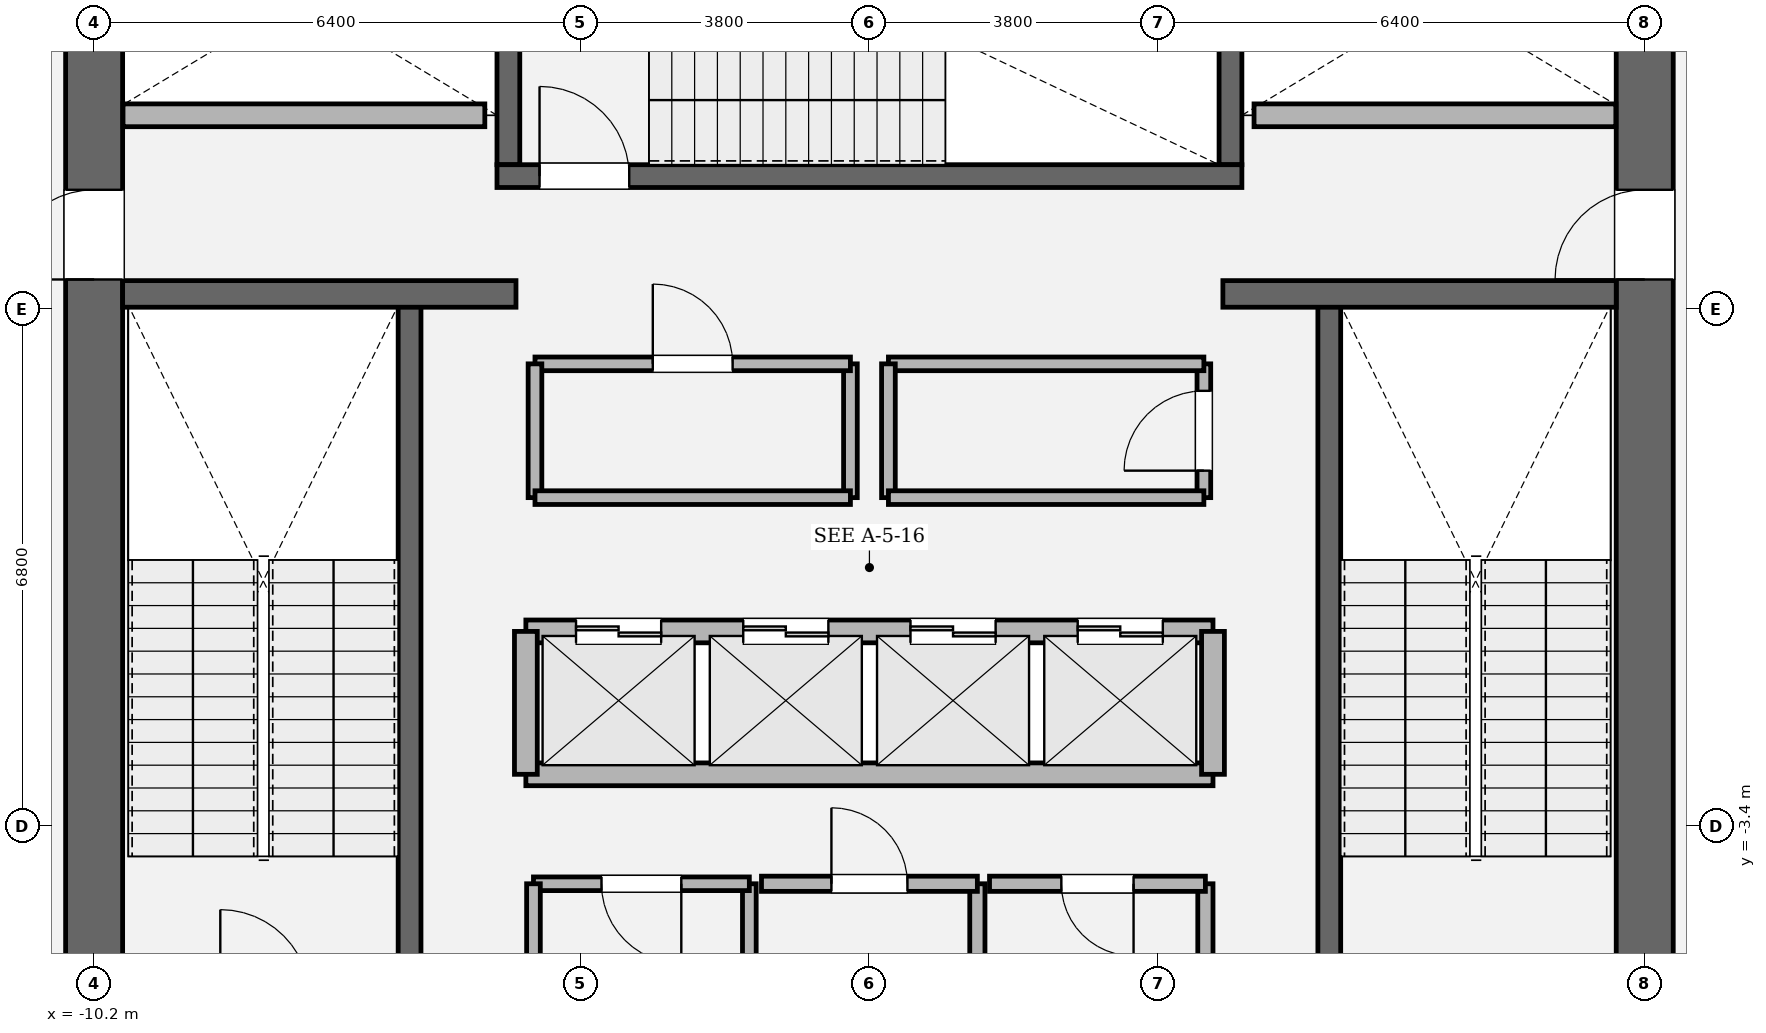
"""IFC4 building model, lengths in metres.
Left out: names, types, materials, properties, quantities, classifications, styles, units other than length and angle.
Written with IfcOpenShell. Run it as: python <this file> out.ifc"""

import sys

from ifc_helpers import new_model, si_unit, direction, frame, frame_2d, origin, place, context, subcontext, project, spatial, rectangle, extrude, element, fill, save


model = new_model("IFC4")
c1 = context("Model", 3, precision=1e-05, world=origin(), true_north=direction((0.0, 1.0)))
c2 = subcontext(c1, "Body", "Model", "MODEL_VIEW")
j1 = project(units=[si_unit("LENGTHUNIT", "METRE"), si_unit("PLANEANGLEUNIT", "RADIAN")], contexts=[c1])
p1 = place(None, origin())
s1 = spatial("IfcSite", under=j1, at=p1, CompositionType="ELEMENT")
p2 = place(p1, origin())
s2 = spatial("IfcBuilding", under=s1, at=p2, CompositionType="ELEMENT")
p3 = place(p2, frame((0.0, 0.0, 76.8)))
s3 = spatial("IfcBuildingStorey", under=s2, at=p3, CompositionType="ELEMENT", Elevation=76.8)
p4 = place(p3, frame((-10.2, -8.825, 0.0), z_axis=(0.0, 0.0, 1.0), x_axis=(0.0, 1.0, 0.0)))
e1 = element("IfcWall", 1, at=p4, inside=s3, PredefinedType="SHEAR", context=c2, shape_type="SweptSolid", body=[
    extrude(rectangle(XDim=17.65, YDim=0.75, at=frame_2d((8.825, 0.0))), origin(), (0.0, 0.0, 1.0), 4.05),
])
p5 = place(p4, frame((12.615, 0.0, 0.0)))
e2 = element("IfcOpeningElement", 2, at=p5, cuts=e1, PredefinedType="OPENING", context=c2, shape_type="SweptSolid", body=[
    extrude(rectangle(XDim=1.18, YDim=2.2, at=frame_2d((0.59, 1.1))), frame((0.0, 0.385, 0.0), z_axis=(0.0, -1.0, 0.0), x_axis=(1.0, 0.0, 0.0)), (0.0, 0.0, 1.0), 0.77),
])
p6 = place(p3, frame((10.2, 8.825, 0.0), z_axis=(0.0, 0.0, 1.0), x_axis=(0.0, -1.0, 0.0)))
e3 = element("IfcWall", 3, at=p6, inside=s3, PredefinedType="SHEAR", context=c2, shape_type="SweptSolid", body=[
    extrude(rectangle(XDim=17.65, YDim=0.75, at=frame_2d((8.825, 0.0))), origin(), (0.0, 0.0, 1.0), 4.05),
])
p7 = place(p6, frame((3.855, 0.0, 0.0)))
e4 = element("IfcOpeningElement", 4, at=p7, cuts=e3, PredefinedType="OPENING", context=c2, shape_type="SweptSolid", body=[
    extrude(rectangle(XDim=1.18, YDim=2.2, at=frame_2d((0.59, 1.1))), frame((0.0, 0.385, 0.0), z_axis=(0.0, -1.0, 0.0), x_axis=(1.0, 0.0, 0.0)), (0.0, 0.0, 1.0), 0.77),
])
for number, where, z_axis, x_axis in (
    (5, (-6.05, -5.5, 0.0), (0.0, 0.0, 1.0), (0.0, 1.0, 0.0)),
    (6, (6.05, 3.45, 0.0), (0.0, 0.0, 1.0), (0.0, -1.0, 0.0)),
):
    element("IfcWall", number, at=place(p3, frame(where, z_axis=z_axis, x_axis=x_axis)), inside=s3, PredefinedType="SOLIDWALL", context=c2, shape_type="SweptSolid", body=[
        extrude(rectangle(XDim=8.95, YDim=0.3, at=frame_2d((4.475, 0.0))), origin(), (0.0, 0.0, 1.0), 4.05),
    ])
for number, where, z_axis, x_axis in (
    (7, (-4.75, 5.3, 0.0), (0.0, 0.0, 1.0), (0.0, 1.0, 0.0)),
    (8, (4.75, 8.825, 0.0), (0.0, 0.0, 1.0), (0.0, -1.0, 0.0)),
):
    element("IfcWall", number, at=place(p3, frame(where, z_axis=z_axis, x_axis=x_axis)), inside=s3, PredefinedType="SOLIDWALL", context=c2, shape_type="SweptSolid", body=[
        extrude(rectangle(XDim=3.525, YDim=0.3, at=frame_2d((1.762, 0.0))), origin(), (0.0, 0.0, 1.0), 4.05),
    ])
p8 = place(p3, frame((-4.9, 5.15, 0.0), z_axis=(0.0, 0.0, 1.0), x_axis=(1.0, 0.0, 0.0)))
e9 = element("IfcWall", 9, at=p8, inside=s3, PredefinedType="SOLIDWALL", context=c2, shape_type="SweptSolid", body=[
    extrude(rectangle(XDim=9.8, YDim=0.3, at=frame_2d((4.9, 0.0))), origin(), (0.0, 0.0, 1.0), 4.05),
])
p9 = place(p8, frame((0.56, 0.0, 0.0)))
e10 = element("IfcOpeningElement", 10, at=p9, cuts=e9, PredefinedType="OPENING", context=c2, shape_type="SweptSolid", body=[
    extrude(rectangle(XDim=1.18, YDim=2.2, at=frame_2d((0.59, 1.1))), frame((0.0, 0.16, 0.0), z_axis=(0.0, -1.0, 0.0), x_axis=(1.0, 0.0, 0.0)), (0.0, 0.0, 1.0), 0.32),
])
for number, where, z_axis, x_axis in (
    (11, (-9.825, 3.6, 0.0), (0.0, 0.0, 1.0), (1.0, 0.0, 0.0)),
    (12, (4.65, 3.6, 0.0), (0.0, 0.0, 1.0), (1.0, 0.0, 0.0)),
):
    element("IfcWall", number, at=place(p3, frame(where, z_axis=z_axis, x_axis=x_axis)), inside=s3, PredefinedType="SOLIDWALL", context=c2, shape_type="SweptSolid", body=[
        extrude(rectangle(XDim=5.175, YDim=0.35, at=frame_2d((2.587, 0.0))), origin(), (0.0, 0.0, 1.0), 4.05),
    ])
p10 = place(p3, frame((-4.52, -0.84, 0.0), z_axis=(0.0, 0.0, 1.0), x_axis=(1.0, 0.0, 0.0)))
e13 = element("IfcWall", 13, at=p10, inside=s3, PredefinedType="SOLIDWALL", context=c2, shape_type="SweptSolid", body=[
    extrude(rectangle(XDim=9.04, YDim=0.3, at=frame_2d((4.52, 0.0))), origin(), (0.0, 0.0, 1.0), 3.81),
])
p11 = place(p10, frame((0.66, 0.0, 0.0)))
e14 = element("IfcOpeningElement", 14, at=p11, cuts=e13, PredefinedType="OPENING", context=c2, shape_type="SweptSolid", body=[
    extrude(rectangle(XDim=1.12, YDim=2.25, at=frame_2d((0.56, 1.125))), frame((0.0, 0.16, 0.0), z_axis=(0.0, -1.0, 0.0), x_axis=(1.0, 0.0, 0.0)), (0.0, 0.0, 1.0), 0.32),
])
p12 = place(p10, frame((2.86, 0.0, 0.0)))
e15 = element("IfcOpeningElement", 15, at=p12, cuts=e13, PredefinedType="OPENING", context=c2, shape_type="SweptSolid", body=[
    extrude(rectangle(XDim=1.12, YDim=2.25, at=frame_2d((0.56, 1.125))), frame((0.0, 0.16, 0.0), z_axis=(0.0, -1.0, 0.0), x_axis=(1.0, 0.0, 0.0)), (0.0, 0.0, 1.0), 0.32),
])
p13 = place(p10, frame((5.06, 0.0, 0.0)))
e16 = element("IfcOpeningElement", 16, at=p13, cuts=e13, PredefinedType="OPENING", context=c2, shape_type="SweptSolid", body=[
    extrude(rectangle(XDim=1.12, YDim=2.25, at=frame_2d((0.56, 1.125))), frame((0.0, 0.16, 0.0), z_axis=(0.0, -1.0, 0.0), x_axis=(1.0, 0.0, 0.0)), (0.0, 0.0, 1.0), 0.32),
])
p14 = place(p10, frame((7.26, 0.0, 0.0)))
e17 = element("IfcOpeningElement", 17, at=p14, cuts=e13, PredefinedType="OPENING", context=c2, shape_type="SweptSolid", body=[
    extrude(rectangle(XDim=1.12, YDim=2.25, at=frame_2d((0.56, 1.125))), frame((0.0, 0.16, 0.0), z_axis=(0.0, -1.0, 0.0), x_axis=(1.0, 0.0, 0.0)), (0.0, 0.0, 1.0), 0.32),
])
p15 = place(p3, frame((-4.52, -2.72, 0.0), z_axis=(0.0, 0.0, 1.0), x_axis=(1.0, 0.0, 0.0)))
e18 = element("IfcWall", 18, at=p15, inside=s3, PredefinedType="SOLIDWALL", context=c2, shape_type="SweptSolid", body=[
    extrude(rectangle(XDim=9.04, YDim=0.3, at=frame_2d((4.52, 0.0))), origin(), (0.0, 0.0, 1.0), 3.81),
])
for number, where, z_axis, x_axis in (
    (19, (-4.52, -2.72, 0.0), (0.0, 0.0, 1.0), (0.0, 1.0, 0.0)),
    (20, (4.52, -2.72, 0.0), (0.0, 0.0, 1.0), (0.0, 1.0, 0.0)),
):
    element("IfcWall", number, at=place(p3, frame(where, z_axis=z_axis, x_axis=x_axis)), inside=s3, PredefinedType="SOLIDWALL", context=c2, shape_type="SweptSolid", body=[
        extrude(rectangle(XDim=1.88, YDim=0.3, at=frame_2d((0.94, 0.0))), origin(), (0.0, 0.0, 1.0), 3.81),
    ])
for number, where, z_axis, x_axis in (
    (21, (-9.82, 5.95, 0.0), (0.0, 0.0, 1.0), (1.0, 0.0, 0.0)),
    (22, (5.06, 5.95, 0.0), (0.0, 0.0, 1.0), (1.0, 0.0, 0.0)),
):
    element("IfcWall", number, at=place(p3, frame(where, z_axis=z_axis, x_axis=x_axis)), inside=s3, PredefinedType="SOLIDWALL", context=c2, shape_type="SweptSolid", body=[
        extrude(rectangle(XDim=4.76, YDim=0.3, at=frame_2d((2.38, 0.0))), origin(), (0.0, 0.0, 1.0), 3.81),
    ])
p16 = place(p3, frame((-1.58, -5.9, 0.0), z_axis=(0.0, 0.0, 1.0), x_axis=(0.0, 1.0, 0.0)))
e23 = element("IfcWall", 23, at=p16, inside=s3, PredefinedType="PARTITIONING", context=c2, shape_type="SweptSolid", body=[
    extrude(rectangle(XDim=1.74, YDim=0.18, at=frame_2d((0.87, 0.0))), origin(), (0.0, 0.0, 1.0), 3.81),
])
p17 = place(p3, frame((-1.58, -4.16, 0.0), z_axis=(0.0, 0.0, 1.0), x_axis=(-1.0, 0.0, 0.0)))
e24 = element("IfcWall", 24, at=p17, inside=s3, PredefinedType="PARTITIONING", context=c2, shape_type="SweptSolid", body=[
    extrude(rectangle(XDim=2.84, YDim=0.18, at=frame_2d((1.42, 0.0))), origin(), (0.0, 0.0, 1.0), 3.81),
])
p18 = place(p17, frame((0.895, 0.0, 0.0)))
e25 = element("IfcOpeningElement", 25, at=p18, cuts=e24, PredefinedType="OPENING", context=c2, shape_type="SweptSolid", body=[
    extrude(rectangle(XDim=1.05, YDim=2.2, at=frame_2d((0.525, 1.1))), frame((0.0, 0.1, 0.0), z_axis=(0.0, -1.0, 0.0), x_axis=(1.0, 0.0, 0.0)), (0.0, 0.0, 1.0), 0.2),
])
p19 = place(p3, frame((-4.42, -4.16, 0.0), z_axis=(0.0, 0.0, 1.0), x_axis=(0.0, -1.0, 0.0)))
e26 = element("IfcWall", 26, at=p19, inside=s3, PredefinedType="PARTITIONING", context=c2, shape_type="SweptSolid", body=[
    extrude(rectangle(XDim=1.74, YDim=0.18, at=frame_2d((0.87, 0.0))), origin(), (0.0, 0.0, 1.0), 3.81),
])
p20 = place(p3, frame((1.42, -5.9, 0.0), z_axis=(0.0, 0.0, 1.0), x_axis=(0.0, 1.0, 0.0)))
e27 = element("IfcWall", 27, at=p20, inside=s3, PredefinedType="SOLIDWALL", context=c2, shape_type="SweptSolid", body=[
    extrude(rectangle(XDim=1.74, YDim=0.2, at=frame_2d((0.87, 0.0))), origin(), (0.0, 0.0, 1.0), 3.81),
])
p21 = place(p3, frame((1.42, -4.16, 0.0), z_axis=(0.0, 0.0, 1.0), x_axis=(-1.0, 0.0, 0.0)))
e28 = element("IfcWall", 28, at=p21, inside=s3, PredefinedType="SOLIDWALL", context=c2, shape_type="SweptSolid", body=[
    extrude(rectangle(XDim=2.84, YDim=0.2, at=frame_2d((1.42, 0.0))), origin(), (0.0, 0.0, 1.0), 3.81),
])
p22 = place(p21, frame((0.92, 0.0, 0.0)))
e29 = element("IfcOpeningElement", 29, at=p22, cuts=e28, PredefinedType="OPENING", context=c2, shape_type="SweptSolid", body=[
    extrude(rectangle(XDim=1.0, YDim=2.15, at=frame_2d((0.5, 1.075))), frame((0.0, 0.11, 0.0), z_axis=(0.0, -1.0, 0.0), x_axis=(1.0, 0.0, 0.0)), (0.0, 0.0, 1.0), 0.22),
])
p23 = place(p3, frame((4.42, -5.9, 0.0), z_axis=(0.0, 0.0, 1.0), x_axis=(0.0, 1.0, 0.0)))
e30 = element("IfcWall", 30, at=p23, inside=s3, PredefinedType="SOLIDWALL", context=c2, shape_type="SweptSolid", body=[
    extrude(rectangle(XDim=1.74, YDim=0.2, at=frame_2d((0.87, 0.0))), origin(), (0.0, 0.0, 1.0), 3.81),
])
p24 = place(p3, frame((4.42, -4.16, 0.0), z_axis=(0.0, 0.0, 1.0), x_axis=(-1.0, 0.0, 0.0)))
e31 = element("IfcWall", 31, at=p24, inside=s3, PredefinedType="SOLIDWALL", context=c2, shape_type="SweptSolid", body=[
    extrude(rectangle(XDim=2.84, YDim=0.2, at=frame_2d((1.42, 0.0))), origin(), (0.0, 0.0, 1.0), 3.81),
])
p25 = place(p24, frame((0.945, 0.0, 0.0)))
e32 = element("IfcOpeningElement", 32, at=p25, cuts=e31, PredefinedType="OPENING", context=c2, shape_type="SweptSolid", body=[
    extrude(rectangle(XDim=0.95, YDim=2.15, at=frame_2d((0.475, 1.075))), frame((0.0, 0.11, 0.0), z_axis=(0.0, -1.0, 0.0), x_axis=(1.0, 0.0, 0.0)), (0.0, 0.0, 1.0), 0.22),
])
p26 = place(p3, frame((-0.25, 0.92, 0.0), z_axis=(0.0, 0.0, 1.0), x_axis=(0.0, 1.0, 0.0)))
e33 = element("IfcWall", 33, at=p26, inside=s3, PredefinedType="PARTITIONING", context=c2, shape_type="SweptSolid", body=[
    extrude(rectangle(XDim=1.76, YDim=0.18, at=frame_2d((0.88, 0.0))), origin(), (0.0, 0.0, 1.0), 3.81),
])
p27 = place(p3, frame((-0.25, 2.68, 0.0), z_axis=(0.0, 0.0, 1.0), x_axis=(-1.0, 0.0, 0.0)))
e34 = element("IfcWall", 34, at=p27, inside=s3, PredefinedType="PARTITIONING", context=c2, shape_type="SweptSolid", body=[
    extrude(rectangle(XDim=4.15, YDim=0.18, at=frame_2d((2.075, 0.0))), origin(), (0.0, 0.0, 1.0), 3.81),
])
p28 = place(p27, frame((1.55, 0.0, 0.0)))
e35 = element("IfcOpeningElement", 35, at=p28, cuts=e34, PredefinedType="OPENING", context=c2, shape_type="SweptSolid", body=[
    extrude(rectangle(XDim=1.05, YDim=2.2, at=frame_2d((0.525, 1.1))), frame((0.0, 0.1, 0.0), z_axis=(0.0, -1.0, 0.0), x_axis=(1.0, 0.0, 0.0)), (0.0, 0.0, 1.0), 0.2),
])
p29 = place(p3, frame((-4.4, 2.68, 0.0), z_axis=(0.0, 0.0, 1.0), x_axis=(0.0, -1.0, 0.0)))
e36 = element("IfcWall", 36, at=p29, inside=s3, PredefinedType="PARTITIONING", context=c2, shape_type="SweptSolid", body=[
    extrude(rectangle(XDim=1.76, YDim=0.18, at=frame_2d((0.88, 0.0))), origin(), (0.0, 0.0, 1.0), 3.81),
])
p30 = place(p3, frame((-4.4, 0.92, 0.0), z_axis=(0.0, 0.0, 1.0), x_axis=(1.0, 0.0, 0.0)))
e37 = element("IfcWall", 37, at=p30, inside=s3, PredefinedType="PARTITIONING", context=c2, shape_type="SweptSolid", body=[
    extrude(rectangle(XDim=4.15, YDim=0.18, at=frame_2d((2.075, 0.0))), origin(), (0.0, 0.0, 1.0), 3.81),
])
p31 = place(p3, frame((4.4, 0.92, 0.0), z_axis=(0.0, 0.0, 1.0), x_axis=(0.0, 1.0, 0.0)))
e38 = element("IfcWall", 38, at=p31, inside=s3, PredefinedType="PARTITIONING", context=c2, shape_type="SweptSolid", body=[
    extrude(rectangle(XDim=1.76, YDim=0.18, at=frame_2d((0.88, 0.0))), origin(), (0.0, 0.0, 1.0), 3.81),
])
p32 = place(p31, frame((0.355, 0.0, 0.0)))
e39 = element("IfcOpeningElement", 39, at=p32, cuts=e38, PredefinedType="OPENING", context=c2, shape_type="SweptSolid", body=[
    extrude(rectangle(XDim=1.05, YDim=2.2, at=frame_2d((0.525, 1.1))), frame((0.0, 0.1, 0.0), z_axis=(0.0, -1.0, 0.0), x_axis=(1.0, 0.0, 0.0)), (0.0, 0.0, 1.0), 0.2),
])
p33 = place(p3, frame((4.4, 2.68, 0.0), z_axis=(0.0, 0.0, 1.0), x_axis=(-1.0, 0.0, 0.0)))
e40 = element("IfcWall", 40, at=p33, inside=s3, PredefinedType="PARTITIONING", context=c2, shape_type="SweptSolid", body=[
    extrude(rectangle(XDim=4.15, YDim=0.18, at=frame_2d((2.075, 0.0))), origin(), (0.0, 0.0, 1.0), 3.81),
])
p34 = place(p3, frame((0.25, 2.68, 0.0), z_axis=(0.0, 0.0, 1.0), x_axis=(0.0, -1.0, 0.0)))
e41 = element("IfcWall", 41, at=p34, inside=s3, PredefinedType="PARTITIONING", context=c2, shape_type="SweptSolid", body=[
    extrude(rectangle(XDim=1.76, YDim=0.18, at=frame_2d((0.88, 0.0))), origin(), (0.0, 0.0, 1.0), 3.81),
])
p35 = place(p3, frame((0.25, 0.92, 0.0), z_axis=(0.0, 0.0, 1.0), x_axis=(1.0, 0.0, 0.0)))
e42 = element("IfcWall", 42, at=p35, inside=s3, PredefinedType="PARTITIONING", context=c2, shape_type="SweptSolid", body=[
    extrude(rectangle(XDim=4.15, YDim=0.18, at=frame_2d((2.075, 0.0))), origin(), (0.0, 0.0, 1.0), 3.81),
])
p36 = place(p9, origin())
e43 = element("IfcDoor", 43, at=p36, inside=s3, OperationType="SINGLE_SWING_LEFT", PredefinedType="DOOR", context=c2, shape_type="SweptSolid", body=[
    extrude(rectangle(XDim=1.18, YDim=2.2, at=frame_2d((0.59, 1.1))), frame((0.0, 0.025, 0.0), z_axis=(0.0, -1.0, 0.0), x_axis=(1.0, 0.0, 0.0)), (0.0, 0.0, 1.0), 0.05),
])
fill(e10, e43)
p37 = place(p5, origin())
e44 = element("IfcDoor", 44, at=p37, inside=s3, OperationType="SINGLE_SWING_LEFT", PredefinedType="DOOR", context=c2, shape_type="SweptSolid", body=[
    extrude(rectangle(XDim=1.18, YDim=2.2, at=frame_2d((0.59, 1.1))), frame((0.0, 0.025, 0.0), z_axis=(0.0, -1.0, 0.0), x_axis=(1.0, 0.0, 0.0)), (0.0, 0.0, 1.0), 0.05),
])
fill(e2, e44)
p38 = place(p7, origin())
e45 = element("IfcDoor", 45, at=p38, inside=s3, OperationType="SINGLE_SWING_RIGHT", PredefinedType="DOOR", context=c2, shape_type="SweptSolid", body=[
    extrude(rectangle(XDim=1.18, YDim=2.2, at=frame_2d((0.59, 1.1))), frame((0.0, 0.025, 0.0), z_axis=(0.0, -1.0, 0.0), x_axis=(1.0, 0.0, 0.0)), (0.0, 0.0, 1.0), 0.05),
])
fill(e4, e45)
p39 = place(p11, origin())
e46 = element("IfcDoor", 46, at=p39, inside=s3, OperationType="DOUBLE_DOOR_SLIDING", PredefinedType="DOOR", context=c2, shape_type="SweptSolid", body=[
    extrude(rectangle(XDim=1.12, YDim=2.25, at=frame_2d((0.56, 1.125))), frame((0.0, 0.025, 0.0), z_axis=(0.0, -1.0, 0.0), x_axis=(1.0, 0.0, 0.0)), (0.0, 0.0, 1.0), 0.05),
])
fill(e14, e46)
p40 = place(p12, origin())
e47 = element("IfcDoor", 47, at=p40, inside=s3, OperationType="DOUBLE_DOOR_SLIDING", PredefinedType="DOOR", context=c2, shape_type="SweptSolid", body=[
    extrude(rectangle(XDim=1.12, YDim=2.25, at=frame_2d((0.56, 1.125))), frame((0.0, 0.025, 0.0), z_axis=(0.0, -1.0, 0.0), x_axis=(1.0, 0.0, 0.0)), (0.0, 0.0, 1.0), 0.05),
])
fill(e15, e47)
p41 = place(p13, origin())
e48 = element("IfcDoor", 48, at=p41, inside=s3, OperationType="DOUBLE_DOOR_SLIDING", PredefinedType="DOOR", context=c2, shape_type="SweptSolid", body=[
    extrude(rectangle(XDim=1.12, YDim=2.25, at=frame_2d((0.56, 1.125))), frame((0.0, 0.025, 0.0), z_axis=(0.0, -1.0, 0.0), x_axis=(1.0, 0.0, 0.0)), (0.0, 0.0, 1.0), 0.05),
])
fill(e16, e48)
p42 = place(p14, origin())
e49 = element("IfcDoor", 49, at=p42, inside=s3, OperationType="DOUBLE_DOOR_SLIDING", PredefinedType="DOOR", context=c2, shape_type="SweptSolid", body=[
    extrude(rectangle(XDim=1.12, YDim=2.25, at=frame_2d((0.56, 1.125))), frame((0.0, 0.025, 0.0), z_axis=(0.0, -1.0, 0.0), x_axis=(1.0, 0.0, 0.0)), (0.0, 0.0, 1.0), 0.05),
])
fill(e17, e49)
p43 = place(p18, origin())
e50 = element("IfcDoor", 50, at=p43, inside=s3, OperationType="SINGLE_SWING_LEFT", PredefinedType="DOOR", context=c2, shape_type="SweptSolid", body=[
    extrude(rectangle(XDim=1.05, YDim=2.2, at=frame_2d((0.525, 1.1))), frame((0.0, 0.025, 0.0), z_axis=(0.0, -1.0, 0.0), x_axis=(1.0, 0.0, 0.0)), (0.0, 0.0, 1.0), 0.05),
])
fill(e25, e50)
p44 = place(p22, origin())
e51 = element("IfcDoor", 51, at=p44, inside=s3, OperationType="SINGLE_SWING_RIGHT", PredefinedType="DOOR", context=c2, shape_type="SweptSolid", body=[
    extrude(rectangle(XDim=1.0, YDim=2.15, at=frame_2d((0.5, 1.075))), frame((0.0, 0.025, 0.0), z_axis=(0.0, -1.0, 0.0), x_axis=(1.0, 0.0, 0.0)), (0.0, 0.0, 1.0), 0.05),
])
fill(e29, e51)
p45 = place(p25, origin())
e52 = element("IfcDoor", 52, at=p45, inside=s3, OperationType="SINGLE_SWING_LEFT", PredefinedType="DOOR", context=c2, shape_type="SweptSolid", body=[
    extrude(rectangle(XDim=0.95, YDim=2.15, at=frame_2d((0.475, 1.075))), frame((0.0, 0.025, 0.0), z_axis=(0.0, -1.0, 0.0), x_axis=(1.0, 0.0, 0.0)), (0.0, 0.0, 1.0), 0.05),
])
fill(e32, e52)
p46 = place(p28, origin())
e53 = element("IfcDoor", 53, at=p46, inside=s3, OperationType="SINGLE_SWING_RIGHT", PredefinedType="DOOR", context=c2, shape_type="SweptSolid", body=[
    extrude(rectangle(XDim=1.05, YDim=2.2, at=frame_2d((0.525, 1.1))), frame((0.0, 0.025, 0.0), z_axis=(0.0, -1.0, 0.0), x_axis=(1.0, 0.0, 0.0)), (0.0, 0.0, 1.0), 0.05),
])
fill(e35, e53)
p47 = place(p32, origin())
e54 = element("IfcDoor", 54, at=p47, inside=s3, OperationType="SINGLE_SWING_LEFT", PredefinedType="DOOR", context=c2, shape_type="SweptSolid", body=[
    extrude(rectangle(XDim=1.05, YDim=2.2, at=frame_2d((0.525, 1.1))), frame((0.0, 0.025, 0.0), z_axis=(0.0, -1.0, 0.0), x_axis=(1.0, 0.0, 0.0)), (0.0, 0.0, 1.0), 0.05),
])
fill(e39, e54)
save(model, sys.argv[1])
